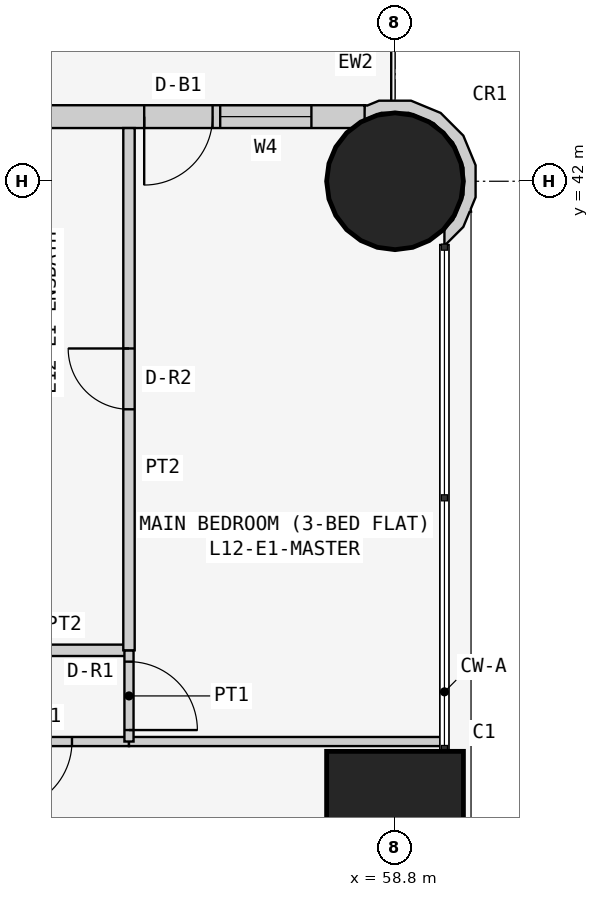
"""IFC4 building model, lengths in metres.
Left out: names, types, materials, properties, quantities, classifications, styles, units other than length and angle.
Written with IfcOpenShell. Run it as: python <this file> out.ifc"""

import sys

from ifc_helpers import new_model, si_unit, direction, frame, frame_2d, origin, origin_2d, place, context, subcontext, project, spatial, polyline, rectangle, circle, outline, extrude, element, fill, save


model = new_model("IFC4")
c1 = context("Model", 3, precision=1e-05, world=origin(), true_north=direction((0.0, 1.0)))
c2 = subcontext(c1, "Body", "Model", "MODEL_VIEW")
j1 = project(units=[si_unit("LENGTHUNIT", "METRE"), si_unit("PLANEANGLEUNIT", "RADIAN")], contexts=[c1])
p1 = place(None, origin())
s1 = spatial("IfcSite", under=j1, at=p1, CompositionType="ELEMENT")
p2 = place(p1, origin())
s2 = spatial("IfcBuilding", under=s1, at=p2, CompositionType="ELEMENT")
p3 = place(p2, frame((0.0, 0.0, 52.5)))
s3 = spatial("IfcBuildingStorey", under=s2, at=p3, CompositionType="ELEMENT", Elevation=52.5)
p4 = place(p3, frame((58.8, 33.6, 0.0), z_axis=(0.0, 0.0, 1.0), x_axis=(1.0, 0.0, 0.0)))
e1 = element("IfcColumn", 1, at=p4, inside=s3, PredefinedType="COLUMN", context=c2, shape_type="SweptSolid", body=[
    extrude(rectangle(XDim=1.8, YDim=1.8, at=origin_2d()), origin(), (0.0, 0.0, 1.0), 3.6),
])
p5 = place(p3, frame((58.8, 42.0, 0.0), z_axis=(0.0, 0.0, 1.0), x_axis=(1.0, 0.0, 0.0)))
e2 = element("IfcColumn", 2, at=p5, inside=s3, PredefinedType="COLUMN", context=c2, shape_type="SweptSolid", body=[
    extrude(circle(Radius=0.9, at=origin_2d()), origin(), (0.0, 0.0, 1.0), 3.6),
])
p6 = place(p3, frame((58.4, 42.85, 0.0), z_axis=(0.0, 0.0, 1.0), x_axis=(-1.0, 0.0, 0.0)))
e3 = element("IfcWall", 3, at=p6, inside=s3, PredefinedType="SOLIDWALL", context=c2, shape_type="SweptSolid", body=[
    extrude(rectangle(XDim=15.7, YDim=0.3, at=frame_2d((7.85, 0.0))), origin(), (0.0, 0.0, 1.0), 3.45),
])
p7 = place(p6, frame((12.4, 0.0, 0.9)))
e4 = element("IfcOpeningElement", 4, at=p7, cuts=e3, PredefinedType="OPENING", context=c2, shape_type="SweptSolid", body=[
    extrude(rectangle(XDim=1.8, YDim=1.5, at=frame_2d((0.9, 0.75))), frame((0.0, 0.16, 0.0), z_axis=(0.0, -1.0, 0.0), x_axis=(1.0, 0.0, 0.0)), (0.0, 0.0, 1.0), 0.32),
])
p8 = place(p6, frame((9.55, 0.0, 1.5)))
e5 = element("IfcOpeningElement", 5, at=p8, cuts=e3, PredefinedType="OPENING", context=c2, shape_type="SweptSolid", body=[
    extrude(rectangle(XDim=0.9, YDim=0.7, at=frame_2d((0.45, 0.35))), frame((0.0, 0.16, 0.0), z_axis=(0.0, -1.0, 0.0), x_axis=(1.0, 0.0, 0.0)), (0.0, 0.0, 1.0), 0.32),
])
p9 = place(p6, frame((5.1, 0.0, 0.9)))
e6 = element("IfcOpeningElement", 6, at=p9, cuts=e3, PredefinedType="OPENING", context=c2, shape_type="SweptSolid", body=[
    extrude(rectangle(XDim=1.8, YDim=1.5, at=frame_2d((0.9, 0.75))), frame((0.0, 0.16, 0.0), z_axis=(0.0, -1.0, 0.0), x_axis=(1.0, 0.0, 0.0)), (0.0, 0.0, 1.0), 0.32),
])
p10 = place(p6, frame((2.0, 0.0, 0.0)))
e7 = element("IfcOpeningElement", 7, at=p10, cuts=e3, PredefinedType="OPENING", context=c2, shape_type="SweptSolid", body=[
    extrude(rectangle(XDim=0.9, YDim=2.4, at=frame_2d((0.45, 1.2))), frame((0.0, 0.16, 0.0), z_axis=(0.0, -1.0, 0.0), x_axis=(1.0, 0.0, 0.0)), (0.0, 0.0, 1.0), 0.32),
])
p11 = place(p6, frame((0.7, 0.0, 0.9)))
e8 = element("IfcOpeningElement", 8, at=p11, cuts=e3, PredefinedType="OPENING", context=c2, shape_type="SweptSolid", body=[
    extrude(rectangle(XDim=1.2, YDim=1.5, at=frame_2d((0.6, 0.75))), frame((0.0, 0.16, 0.0), z_axis=(0.0, -1.0, 0.0), x_axis=(1.0, 0.0, 0.0)), (0.0, 0.0, 1.0), 0.32),
])
p12 = place(p3, frame((59.411, 41.233, 0.0), z_axis=(0.0, 0.0, 1.0), x_axis=(0.926129809145, 0.377204953059, 0.0)))
e9 = element("IfcWall", 9, at=p12, inside=s3, PredefinedType="SOLIDWALL", context=c2, shape_type="SweptSolid", body=[
    extrude(outline(polyline([(0.626, 0.345), (0.785, 0.736), (0.782, 1.157), (0.619, 1.546), (0.319, 1.843), (-0.072, 2.002), (-0.24, 2.001), (-0.27, 2.017), (-0.37, 1.841), (-0.102, 1.842), (0.23, 1.707), (0.485, 1.455), (0.624, 1.125), (0.626, 0.766), (0.491, 0.434), (0.238, 0.179), (0.09, 0.117), (0.011, -0.078), (0.024, -0.083), (0.329, 0.045), (0.48, 0.198), (0.499, 0.193), (0.508, 0.225), (0.626, 0.345)])), origin(), (0.0, 0.0, 1.0), 3.45),
])
p13 = place(p3, frame((55.3, 34.629, 0.0), z_axis=(0.0, 0.0, 1.0), x_axis=(-1.0, 0.0, 0.0)))
e10 = element("IfcWall", 10, at=p13, inside=s3, PredefinedType="PARTITIONING", context=c2, shape_type="SweptSolid", body=[
    extrude(rectangle(XDim=3.9, YDim=0.12, at=frame_2d((1.95, 0.0))), origin(), (0.0, 0.0, 1.0), 3.45),
])
p14 = place(p13, frame((0.75, 0.0, 0.0)))
e11 = element("IfcOpeningElement", 11, at=p14, cuts=e10, PredefinedType="OPENING", context=c2, shape_type="SweptSolid", body=[
    extrude(rectangle(XDim=0.9, YDim=2.1, at=frame_2d((0.45, 1.05))), frame((0.0, 0.07, 0.0), z_axis=(0.0, -1.0, 0.0), x_axis=(1.0, 0.0, 0.0)), (0.0, 0.0, 1.0), 0.14),
])
p15 = place(p3, frame((59.45, 34.629, 0.0), z_axis=(0.0, 0.0, 1.0), x_axis=(-1.0, 0.0, 0.0)))
e12 = element("IfcWall", 12, at=p15, inside=s3, PredefinedType="PARTITIONING", context=c2, shape_type="SweptSolid", body=[
    extrude(rectangle(XDim=4.15, YDim=0.12, at=frame_2d((2.075, 0.0))), origin(), (0.0, 0.0, 1.0), 3.45),
])
p16 = place(p3, frame((55.3, 35.829, 0.0), z_axis=(0.0, 0.0, 1.0), x_axis=(-1.0, 0.0, 0.0)))
e13 = element("IfcWall", 13, at=p16, inside=s3, PredefinedType="PARTITIONING", context=c2, shape_type="SweptSolid", body=[
    extrude(rectangle(XDim=1.7, YDim=0.15, at=frame_2d((0.85, 0.0))), origin(), (0.0, 0.0, 1.0), 3.45),
])
p17 = place(p3, frame((55.3, 34.629, 0.0), z_axis=(0.0, 0.0, 1.0), x_axis=(0.0, 1.0, 0.0)))
e14 = element("IfcWall", 14, at=p17, inside=s3, PredefinedType="PARTITIONING", context=c2, shape_type="SweptSolid", body=[
    extrude(rectangle(XDim=1.2, YDim=0.12, at=frame_2d((0.6, 0.0))), origin(), (0.0, 0.0, 1.0), 3.45),
])
p18 = place(p17, frame((0.151, 0.0, 0.0)))
e15 = element("IfcOpeningElement", 15, at=p18, cuts=e14, PredefinedType="OPENING", context=c2, shape_type="SweptSolid", body=[
    extrude(rectangle(XDim=0.9, YDim=2.1, at=frame_2d((0.45, 1.05))), frame((0.0, 0.07, 0.0), z_axis=(0.0, -1.0, 0.0), x_axis=(1.0, 0.0, 0.0)), (0.0, 0.0, 1.0), 0.14),
])
p19 = place(p3, frame((55.3, 35.829, 0.0), z_axis=(0.0, 0.0, 1.0), x_axis=(0.0, 1.0, 0.0)))
e16 = element("IfcWall", 16, at=p19, inside=s3, PredefinedType="PARTITIONING", context=c2, shape_type="SweptSolid", body=[
    extrude(rectangle(XDim=6.871, YDim=0.15, at=frame_2d((3.436, 0.0))), origin(), (0.0, 0.0, 1.0), 3.45),
])
p20 = place(p19, frame((3.171, 0.0, 0.0)))
e17 = element("IfcOpeningElement", 17, at=p20, cuts=e16, PredefinedType="OPENING", context=c2, shape_type="SweptSolid", body=[
    extrude(rectangle(XDim=0.8, YDim=2.1, at=frame_2d((0.4, 1.05))), frame((0.0, 0.085, 0.0), z_axis=(0.0, -1.0, 0.0), x_axis=(1.0, 0.0, 0.0)), (0.0, 0.0, 1.0), 0.17),
])
p21 = place(p10, origin())
e18 = element("IfcDoor", 18, at=p21, inside=s3, OperationType="SINGLE_SWING_RIGHT", PredefinedType="DOOR", context=c2, shape_type="SweptSolid", body=[
    extrude(rectangle(XDim=0.9, YDim=2.4, at=frame_2d((0.45, 1.2))), frame((0.0, 0.025, 0.0), z_axis=(0.0, -1.0, 0.0), x_axis=(1.0, 0.0, 0.0)), (0.0, 0.0, 1.0), 0.05),
])
fill(e7, e18)
p22 = place(p11, origin())
e19 = element("IfcWindow", 19, at=p22, inside=s3, PartitioningType="SINGLE_PANEL", PredefinedType="WINDOW", context=c2, shape_type="SweptSolid", body=[
    extrude(rectangle(XDim=1.2, YDim=1.5, at=frame_2d((0.6, 0.75))), frame((0.0, 0.03, 0.0), z_axis=(0.0, -1.0, 0.0), x_axis=(1.0, 0.0, 0.0)), (0.0, 0.0, 1.0), 0.06),
])
fill(e8, e19)
p23 = place(p14, origin())
e20 = element("IfcDoor", 20, at=p23, inside=s3, OperationType="SINGLE_SWING_RIGHT", PredefinedType="DOOR", context=c2, shape_type="SweptSolid", body=[
    extrude(rectangle(XDim=0.9, YDim=2.1, at=frame_2d((0.45, 1.05))), frame((0.0, 0.025, 0.0), z_axis=(0.0, -1.0, 0.0), x_axis=(1.0, 0.0, 0.0)), (0.0, 0.0, 1.0), 0.05),
])
fill(e11, e20)
p24 = place(p18, frame((0.9, 0.0, 0.0), z_axis=(0.0, 0.0, 1.0), x_axis=(-1.0, 0.0, 0.0)))
e21 = element("IfcDoor", 21, at=p24, inside=s3, OperationType="SINGLE_SWING_RIGHT", PredefinedType="DOOR", context=c2, shape_type="SweptSolid", body=[
    extrude(rectangle(XDim=0.9, YDim=2.1, at=frame_2d((0.45, 1.05))), frame((0.0, 0.025, 0.0), z_axis=(0.0, -1.0, 0.0), x_axis=(1.0, 0.0, 0.0)), (0.0, 0.0, 1.0), 0.05),
])
fill(e15, e21)
p25 = place(p20, origin())
e22 = element("IfcDoor", 22, at=p25, inside=s3, OperationType="SINGLE_SWING_RIGHT", PredefinedType="DOOR", context=c2, shape_type="SweptSolid", body=[
    extrude(rectangle(XDim=0.8, YDim=2.1, at=frame_2d((0.4, 1.05))), frame((0.0, 0.025, 0.0), z_axis=(0.0, -1.0, 0.0), x_axis=(1.0, 0.0, 0.0)), (0.0, 0.0, 1.0), 0.05),
])
fill(e17, e22)
save(model, sys.argv[1])
